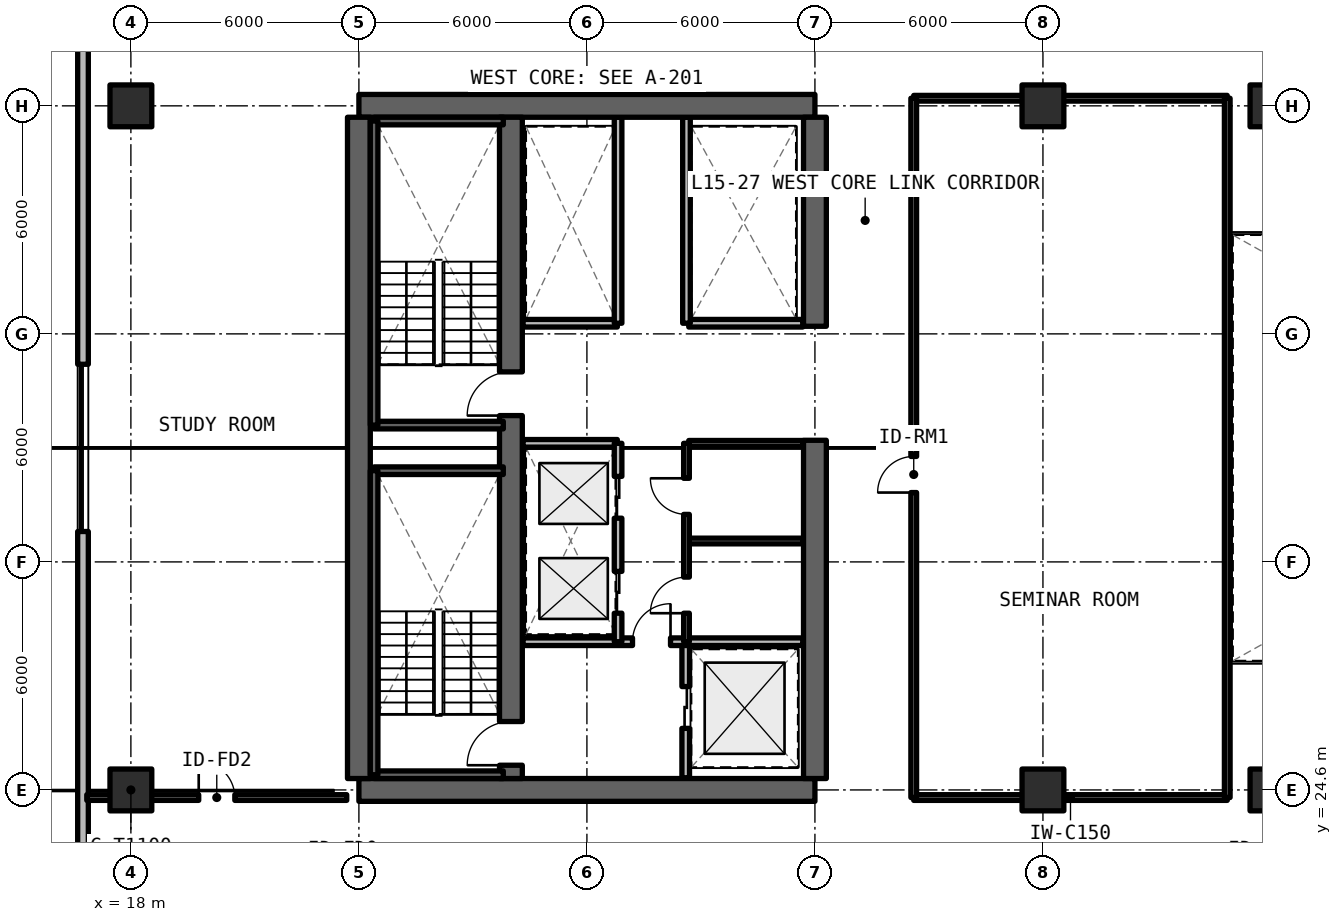
"""IFC4 building model, lengths in metres.
Left out: names, types, materials, properties, quantities, classifications, styles, units other than length and angle.
Written with IfcOpenShell. Run it as: python <this file> out.ifc"""

import sys

from ifc_helpers import new_model, si_unit, direction, frame, frame_2d, origin, origin_2d, place, context, subcontext, project, spatial, rectangle, extrude, element, fill, save


model = new_model("IFC4")
c1 = context("Model", 3, precision=1e-05, world=origin(), true_north=direction((0.0, 1.0)))
c2 = subcontext(c1, "Body", "Model", "MODEL_VIEW")
j1 = project(units=[si_unit("LENGTHUNIT", "METRE"), si_unit("PLANEANGLEUNIT", "RADIAN")], contexts=[c1])
p1 = place(None, origin())
s1 = spatial("IfcSite", under=j1, at=p1, CompositionType="ELEMENT")
p2 = place(p1, origin())
s2 = spatial("IfcBuilding", under=s1, at=p2, CompositionType="ELEMENT")
p3 = place(p2, frame((0.0, 0.0, 55.44)))
s3 = spatial("IfcBuildingStorey", under=s2, at=p3, CompositionType="ELEMENT", Elevation=55.44)
for number, where, z_axis, x_axis in (
    (1, (24.0, 24.6, 0.0), (0.0, 0.0, 1.0), (1.0, 0.0, 0.0)),
    (2, (36.0, 42.6, 0.0), (0.0, 0.0, 1.0), (-1.0, 0.0, 0.0)),
):
    element("IfcWall", number, at=place(p3, frame(where, z_axis=z_axis, x_axis=x_axis)), inside=s3, PredefinedType="SHEAR", context=c2, shape_type="SweptSolid", body=[
        extrude(rectangle(XDim=12.0, YDim=0.6, at=frame_2d((6.0, 0.0))), origin(), (0.0, 0.0, 1.0), 3.3),
    ])
p4 = place(p3, frame((24.0, 24.9, 0.0), z_axis=(0.0, 0.0, 1.0), x_axis=(0.0, 1.0, 0.0)))
e3 = element("IfcWall", 3, at=p4, inside=s3, PredefinedType="SHEAR", context=c2, shape_type="SweptSolid", body=[
    extrude(rectangle(XDim=17.4, YDim=0.6, at=frame_2d((8.7, 0.0))), origin(), (0.0, 0.0, 1.0), 3.3),
])
p5 = place(p3, frame((36.0, 24.9, 0.0), z_axis=(0.0, 0.0, 1.0), x_axis=(0.0, 1.0, 0.0)))
e4 = element("IfcWall", 4, at=p5, inside=s3, PredefinedType="SHEAR", context=c2, shape_type="SweptSolid", body=[
    extrude(rectangle(XDim=8.9, YDim=0.6, at=frame_2d((4.45, 0.0))), origin(), (0.0, 0.0, 1.0), 3.3),
])
p6 = place(p3, frame((36.0, 36.8, 0.0), z_axis=(0.0, 0.0, 1.0), x_axis=(0.0, 1.0, 0.0)))
e5 = element("IfcWall", 5, at=p6, inside=s3, PredefinedType="SHEAR", context=c2, shape_type="SweptSolid", body=[
    extrude(rectangle(XDim=5.5, YDim=0.6, at=frame_2d((2.75, 0.0))), origin(), (0.0, 0.0, 1.0), 3.3),
])
p7 = place(p3, frame((28.0, 24.9, 0.0), z_axis=(0.0, 0.0, 1.0), x_axis=(0.0, 1.0, 0.0)))
e6 = element("IfcWall", 6, at=p7, inside=s3, PredefinedType="SHEAR", context=c2, shape_type="SweptSolid", body=[
    extrude(rectangle(XDim=17.4, YDim=0.6, at=frame_2d((8.7, 0.0))), origin(), (0.0, 0.0, 1.0), 3.3),
])
p8 = place(p7, frame((0.35, 0.0, 0.0)))
e7 = element("IfcOpeningElement", 7, at=p8, cuts=e6, PredefinedType="OPENING", context=c2, shape_type="SweptSolid", body=[
    extrude(rectangle(XDim=1.15, YDim=2.15, at=frame_2d((0.575, 1.075))), frame((0.0, 0.31, 0.0), z_axis=(0.0, -1.0, 0.0), x_axis=(1.0, 0.0, 0.0)), (0.0, 0.0, 1.0), 0.62),
])
p9 = place(p7, frame((9.55, 0.0, 0.0)))
e8 = element("IfcOpeningElement", 8, at=p9, cuts=e6, PredefinedType="OPENING", context=c2, shape_type="SweptSolid", body=[
    extrude(rectangle(XDim=1.15, YDim=2.15, at=frame_2d((0.575, 1.075))), frame((0.0, 0.31, 0.0), z_axis=(0.0, -1.0, 0.0), x_axis=(1.0, 0.0, 0.0)), (0.0, 0.0, 1.0), 0.62),
])
for number, where, z_axis, x_axis in (
    (9, (18.0, 24.6, 0.0), (0.0, 0.0, 1.0), (1.0, 0.0, 0.0)),
    (10, (18.0, 42.6, 0.0), (0.0, 0.0, 1.0), (1.0, 0.0, 0.0)),
    (11, (42.0, 24.6, 0.0), (0.0, 0.0, 1.0), (1.0, 0.0, 0.0)),
    (12, (42.0, 42.6, 0.0), (0.0, 0.0, 1.0), (1.0, 0.0, 0.0)),
    (13, (48.0, 24.6, 0.0), (0.0, 0.0, 1.0), (1.0, 0.0, 0.0)),
    (14, (48.0, 42.6, 0.0), (0.0, 0.0, 1.0), (1.0, 0.0, 0.0)),
):
    element("IfcColumn", number, at=place(p3, frame(where, z_axis=z_axis, x_axis=x_axis)), inside=s3, PredefinedType="COLUMN", context=c2, shape_type="SweptSolid", body=[
        extrude(rectangle(XDim=1.1, YDim=1.1, at=origin_2d()), origin(), (0.0, 0.0, 1.0), 3.3),
    ])
p10 = place(p3, frame((16.74, 55.342, 0.0), z_axis=(0.0, 0.0, 1.0), x_axis=(0.0, -1.0, 0.0)))
e15 = element("IfcWall", 15, at=p10, inside=s3, PredefinedType="SOLIDWALL", context=c2, shape_type="SweptSolid", body=[
    extrude(rectangle(XDim=43.484, YDim=0.28, at=frame_2d((21.742, 0.0))), origin(), (0.0, 0.0, 1.0), 3.08),
])
p11 = place(p10, frame((19.542, 0.0, 0.78)))
e16 = element("IfcOpeningElement", 16, at=p11, cuts=e15, PredefinedType="OPENING", context=c2, shape_type="SweptSolid", body=[
    extrude(rectangle(XDim=4.4, YDim=1.66, at=frame_2d((2.2, 0.83))), frame((0.0, 0.15, 0.0), z_axis=(0.0, -1.0, 0.0), x_axis=(1.0, 0.0, 0.0)), (0.0, 0.0, 1.0), 0.3),
])
p12 = place(p10, frame((37.573, 0.0, 0.78)))
e17 = element("IfcOpeningElement", 17, at=p12, cuts=e15, PredefinedType="OPENING", context=c2, shape_type="SweptSolid", body=[
    extrude(rectangle(XDim=4.4, YDim=1.66, at=frame_2d((2.2, 0.83))), frame((0.0, 0.15, 0.0), z_axis=(0.0, -1.0, 0.0), x_axis=(1.0, 0.0, 0.0)), (0.0, 0.0, 1.0), 0.3),
])
p13 = place(p3, frame((32.6, 24.92, 0.0), z_axis=(0.0, 0.0, 1.0), x_axis=(0.0, 1.0, 0.0)))
e18 = element("IfcWall", 18, at=p13, inside=s3, PredefinedType="SOLIDWALL", context=c2, shape_type="SweptSolid", body=[
    extrude(rectangle(XDim=3.58, YDim=0.2, at=frame_2d((1.79, 0.0))), origin(), (0.0, 0.0, 1.0), 2.35),
])
p14 = place(p13, frame((1.3, 0.0, 0.0)))
e19 = element("IfcOpeningElement", 19, at=p14, cuts=e18, PredefinedType="OPENING", context=c2, shape_type="SweptSolid", body=[
    extrude(rectangle(XDim=1.1, YDim=2.2, at=frame_2d((0.55, 1.1))), frame((0.0, 0.11, 0.0), z_axis=(0.0, -1.0, 0.0), x_axis=(1.0, 0.0, 0.0)), (0.0, 0.0, 1.0), 0.22),
])
p15 = place(p3, frame((28.32, 28.5, 0.0), z_axis=(0.0, 0.0, 1.0), x_axis=(1.0, 0.0, 0.0)))
e20 = element("IfcWall", 20, at=p15, inside=s3, PredefinedType="SOLIDWALL", context=c2, shape_type="SweptSolid", body=[
    extrude(rectangle(XDim=7.36, YDim=0.2, at=frame_2d((3.68, 0.0))), origin(), (0.0, 0.0, 1.0), 2.35),
])
p16 = place(p15, frame((2.88, 0.0, 0.0)))
e21 = element("IfcOpeningElement", 21, at=p16, cuts=e20, PredefinedType="OPENING", context=c2, shape_type="SweptSolid", body=[
    extrude(rectangle(XDim=1.0, YDim=2.15, at=frame_2d((0.5, 1.075))), frame((0.0, 0.11, 0.0), z_axis=(0.0, -1.0, 0.0), x_axis=(1.0, 0.0, 0.0)), (0.0, 0.0, 1.0), 0.22),
])
p17 = place(p3, frame((28.32, 33.72, 0.0), z_axis=(0.0, 0.0, 1.0), x_axis=(1.0, 0.0, 0.0)))
e22 = element("IfcWall", 22, at=p17, inside=s3, PredefinedType="SOLIDWALL", context=c2, shape_type="SweptSolid", body=[
    extrude(rectangle(XDim=2.48, YDim=0.2, at=frame_2d((1.24, 0.0))), origin(), (0.0, 0.0, 1.0), 2.35),
])
p18 = place(p3, frame((30.82, 28.5, 0.0), z_axis=(0.0, 0.0, 1.0), x_axis=(0.0, 1.0, 0.0)))
e23 = element("IfcWall", 23, at=p18, inside=s3, PredefinedType="SOLIDWALL", context=c2, shape_type="SweptSolid", body=[
    extrude(rectangle(XDim=5.22, YDim=0.2, at=frame_2d((2.61, 0.0))), origin(), (0.0, 0.0, 1.0), 2.35),
])
p19 = place(p18, frame((0.75, 0.0, 0.0)))
e24 = element("IfcOpeningElement", 24, at=p19, cuts=e23, PredefinedType="OPENING", context=c2, shape_type="SweptSolid", body=[
    extrude(rectangle(XDim=1.1, YDim=2.2, at=frame_2d((0.55, 1.1))), frame((0.0, 0.11, 0.0), z_axis=(0.0, -1.0, 0.0), x_axis=(1.0, 0.0, 0.0)), (0.0, 0.0, 1.0), 0.22),
])
p20 = place(p18, frame((3.25, 0.0, 0.0)))
e25 = element("IfcOpeningElement", 25, at=p20, cuts=e23, PredefinedType="OPENING", context=c2, shape_type="SweptSolid", body=[
    extrude(rectangle(XDim=1.1, YDim=2.2, at=frame_2d((0.55, 1.1))), frame((0.0, 0.11, 0.0), z_axis=(0.0, -1.0, 0.0), x_axis=(1.0, 0.0, 0.0)), (0.0, 0.0, 1.0), 0.22),
])
for number, where, z_axis, x_axis in (
    (26, (32.68, 31.15, 0.0), (0.0, 0.0, 1.0), (1.0, 0.0, 0.0)),
    (27, (32.68, 33.72, 0.0), (0.0, 0.0, 1.0), (1.0, 0.0, 0.0)),
):
    element("IfcWall", number, at=place(p3, frame(where, z_axis=z_axis, x_axis=x_axis)), inside=s3, PredefinedType="SOLIDWALL", context=c2, shape_type="SweptSolid", body=[
        extrude(rectangle(XDim=3.0, YDim=0.15, at=frame_2d((1.5, 0.0))), origin(), (0.0, 0.0, 1.0), 2.35),
    ])
p21 = place(p3, frame((32.62, 28.5, 0.0), z_axis=(0.0, 0.0, 1.0), x_axis=(0.0, 1.0, 0.0)))
e28 = element("IfcWall", 28, at=p21, inside=s3, PredefinedType="SOLIDWALL", context=c2, shape_type="SweptSolid", body=[
    extrude(rectangle(XDim=5.22, YDim=0.15, at=frame_2d((2.61, 0.0))), origin(), (0.0, 0.0, 1.0), 2.35),
])
p22 = place(p21, frame((0.75, 0.0, 0.0)))
e29 = element("IfcOpeningElement", 29, at=p22, cuts=e28, PredefinedType="OPENING", context=c2, shape_type="SweptSolid", body=[
    extrude(rectangle(XDim=0.95, YDim=2.15, at=frame_2d((0.475, 1.075))), frame((0.0, 0.085, 0.0), z_axis=(0.0, -1.0, 0.0), x_axis=(1.0, 0.0, 0.0)), (0.0, 0.0, 1.0), 0.17),
])
p23 = place(p21, frame((3.35, 0.0, 0.0)))
e30 = element("IfcOpeningElement", 30, at=p23, cuts=e28, PredefinedType="OPENING", context=c2, shape_type="SweptSolid", body=[
    extrude(rectangle(XDim=0.95, YDim=2.15, at=frame_2d((0.475, 1.075))), frame((0.0, 0.085, 0.0), z_axis=(0.0, -1.0, 0.0), x_axis=(1.0, 0.0, 0.0)), (0.0, 0.0, 1.0), 0.17),
])
p24 = place(p3, frame((28.32, 36.88, 0.0), z_axis=(0.0, 0.0, 1.0), x_axis=(1.0, 0.0, 0.0)))
e31 = element("IfcWall", 31, at=p24, inside=s3, PredefinedType="SOLIDWALL", context=c2, shape_type="SweptSolid", body=[
    extrude(rectangle(XDim=2.48, YDim=0.2, at=frame_2d((1.24, 0.0))), origin(), (0.0, 0.0, 1.0), 2.35),
])
p25 = place(p3, frame((30.82, 36.88, 0.0), z_axis=(0.0, 0.0, 1.0), x_axis=(0.0, 1.0, 0.0)))
e32 = element("IfcWall", 32, at=p25, inside=s3, PredefinedType="SOLIDWALL", context=c2, shape_type="SweptSolid", body=[
    extrude(rectangle(XDim=5.42, YDim=0.2, at=frame_2d((2.71, 0.0))), origin(), (0.0, 0.0, 1.0), 2.35),
])
p26 = place(p3, frame((32.68, 36.88, 0.0), z_axis=(0.0, 0.0, 1.0), x_axis=(1.0, 0.0, 0.0)))
e33 = element("IfcWall", 33, at=p26, inside=s3, PredefinedType="SOLIDWALL", context=c2, shape_type="SweptSolid", body=[
    extrude(rectangle(XDim=3.0, YDim=0.2, at=frame_2d((1.5, 0.0))), origin(), (0.0, 0.0, 1.0), 2.35),
])
p27 = place(p3, frame((32.62, 36.88, 0.0), z_axis=(0.0, 0.0, 1.0), x_axis=(0.0, 1.0, 0.0)))
e34 = element("IfcWall", 34, at=p27, inside=s3, PredefinedType="SOLIDWALL", context=c2, shape_type="SweptSolid", body=[
    extrude(rectangle(XDim=5.42, YDim=0.2, at=frame_2d((2.71, 0.0))), origin(), (0.0, 0.0, 1.0), 2.35),
])
for number, where, z_axis, x_axis in (
    (35, (38.6, 24.4, 0.0), (0.0, 0.0, 1.0), (1.0, 0.0, 0.0)),
    (36, (38.6, 42.8, 0.0), (0.0, 0.0, 1.0), (1.0, 0.0, 0.0)),
):
    element("IfcWall", number, at=place(p3, frame(where, z_axis=z_axis, x_axis=x_axis)), inside=s3, PredefinedType="SOLIDWALL", context=c2, shape_type="SweptSolid", body=[
        extrude(rectangle(XDim=8.25, YDim=0.15, at=frame_2d((4.125, 0.0))), origin(), (0.0, 0.0, 1.0), 2.295),
    ])
p28 = place(p3, frame((38.6, 24.4, 0.0), z_axis=(0.0, 0.0, 1.0), x_axis=(0.0, 1.0, 0.0)))
e37 = element("IfcWall", 37, at=p28, inside=s3, PredefinedType="SOLIDWALL", context=c2, shape_type="SweptSolid", body=[
    extrude(rectangle(XDim=18.4, YDim=0.15, at=frame_2d((9.2, 0.0))), origin(), (0.0, 0.0, 1.0), 2.35),
])
p29 = place(p28, frame((8.025, 0.0, 0.0)))
e38 = element("IfcOpeningElement", 38, at=p29, cuts=e37, PredefinedType="OPENING", context=c2, shape_type="SweptSolid", body=[
    extrude(rectangle(XDim=0.95, YDim=2.15, at=frame_2d((0.475, 1.075))), frame((0.0, 0.085, 0.0), z_axis=(0.0, -1.0, 0.0), x_axis=(1.0, 0.0, 0.0)), (0.0, 0.0, 1.0), 0.17),
])
p30 = place(p3, frame((46.85, 24.4, 0.0), z_axis=(0.0, 0.0, 1.0), x_axis=(0.0, 1.0, 0.0)))
e39 = element("IfcWall", 39, at=p30, inside=s3, PredefinedType="SOLIDWALL", context=c2, shape_type="SweptSolid", body=[
    extrude(rectangle(XDim=18.4, YDim=0.15, at=frame_2d((9.2, 0.0))), origin(), (0.0, 0.0, 1.0), 2.35),
])
p31 = place(p3, frame((16.84, 24.4, 0.0), z_axis=(0.0, 0.0, 1.0), x_axis=(1.0, 0.0, 0.0)))
e40 = element("IfcWall", 40, at=p31, inside=s3, PredefinedType="SOLIDWALL", context=c2, shape_type="SweptSolid", body=[
    extrude(rectangle(XDim=6.84, YDim=0.15, at=frame_2d((3.42, 0.0))), origin(), (0.0, 0.0, 1.0), 2.295),
])
p32 = place(p31, frame((2.945, 0.0, 0.0)))
e41 = element("IfcOpeningElement", 41, at=p32, cuts=e40, PredefinedType="OPENING", context=c2, shape_type="SweptSolid", body=[
    extrude(rectangle(XDim=0.95, YDim=2.15, at=frame_2d((0.475, 1.075))), frame((0.0, 0.085, 0.0), z_axis=(0.0, -1.0, 0.0), x_axis=(1.0, 0.0, 0.0)), (0.0, 0.0, 1.0), 0.17),
])
for number, where, z_axis, x_axis in (
    (42, (24.4, 25.0, 0.0), (0.0, 0.0, 1.0), (1.0, 0.0, 0.0)),
    (43, (27.8, 33.0, 0.0), (0.0, 0.0, 1.0), (-1.0, 0.0, 0.0)),
):
    element("IfcWall", number, at=place(p3, frame(where, z_axis=z_axis, x_axis=x_axis)), inside=s3, PredefinedType="SOLIDWALL", context=c2, shape_type="SweptSolid", body=[
        extrude(rectangle(XDim=3.4, YDim=0.2, at=frame_2d((1.7, 0.0))), origin(), (0.0, 0.0, 1.0), 3.3),
    ])
p33 = place(p3, frame((24.4, 33.0, 0.0), z_axis=(0.0, 0.0, 1.0), x_axis=(0.0, -1.0, 0.0)))
e44 = element("IfcWall", 44, at=p33, inside=s3, PredefinedType="SOLIDWALL", context=c2, shape_type="SweptSolid", body=[
    extrude(rectangle(XDim=8.0, YDim=0.2, at=frame_2d((4.0, 0.0))), origin(), (0.0, 0.0, 1.0), 3.3),
])
for number, where, z_axis, x_axis in (
    (45, (24.4, 34.2, 0.0), (0.0, 0.0, 1.0), (1.0, 0.0, 0.0)),
    (46, (27.8, 42.2, 0.0), (0.0, 0.0, 1.0), (-1.0, 0.0, 0.0)),
):
    element("IfcWall", number, at=place(p3, frame(where, z_axis=z_axis, x_axis=x_axis)), inside=s3, PredefinedType="SOLIDWALL", context=c2, shape_type="SweptSolid", body=[
        extrude(rectangle(XDim=3.4, YDim=0.2, at=frame_2d((1.7, 0.0))), origin(), (0.0, 0.0, 1.0), 3.3),
    ])
p34 = place(p3, frame((24.4, 42.2, 0.0), z_axis=(0.0, 0.0, 1.0), x_axis=(0.0, -1.0, 0.0)))
e47 = element("IfcWall", 47, at=p34, inside=s3, PredefinedType="SOLIDWALL", context=c2, shape_type="SweptSolid", body=[
    extrude(rectangle(XDim=8.0, YDim=0.2, at=frame_2d((4.0, 0.0))), origin(), (0.0, 0.0, 1.0), 3.3),
])
p35 = place(p11, origin())
e48 = element("IfcWindow", 48, at=p35, inside=s3, PartitioningType="SINGLE_PANEL", PredefinedType="WINDOW", context=c2, shape_type="SweptSolid", body=[
    extrude(rectangle(XDim=4.4, YDim=1.66, at=frame_2d((2.2, 0.83))), frame((0.0, 0.03, 0.0), z_axis=(0.0, -1.0, 0.0), x_axis=(1.0, 0.0, 0.0)), (0.0, 0.0, 1.0), 0.06),
])
fill(e16, e48)
p36 = place(p14, origin())
e49 = element("IfcDoor", 49, at=p36, inside=s3, OperationType="SLIDING_TO_LEFT", PredefinedType="DOOR", context=c2, shape_type="SweptSolid", body=[
    extrude(rectangle(XDim=1.1, YDim=2.2, at=frame_2d((0.55, 1.1))), frame((0.0, 0.025, 0.0), z_axis=(0.0, -1.0, 0.0), x_axis=(1.0, 0.0, 0.0)), (0.0, 0.0, 1.0), 0.05),
])
fill(e19, e49)
p37 = place(p16, origin())
e50 = element("IfcDoor", 50, at=p37, inside=s3, OperationType="SINGLE_SWING_RIGHT", PredefinedType="DOOR", context=c2, shape_type="SweptSolid", body=[
    extrude(rectangle(XDim=1.0, YDim=2.15, at=frame_2d((0.5, 1.075))), frame((0.0, 0.025, 0.0), z_axis=(0.0, -1.0, 0.0), x_axis=(1.0, 0.0, 0.0)), (0.0, 0.0, 1.0), 0.05),
])
fill(e21, e50)
p38 = place(p19, origin())
e51 = element("IfcDoor", 51, at=p38, inside=s3, OperationType="SLIDING_TO_LEFT", PredefinedType="DOOR", context=c2, shape_type="SweptSolid", body=[
    extrude(rectangle(XDim=1.1, YDim=2.2, at=frame_2d((0.55, 1.1))), frame((0.0, 0.025, 0.0), z_axis=(0.0, -1.0, 0.0), x_axis=(1.0, 0.0, 0.0)), (0.0, 0.0, 1.0), 0.05),
])
fill(e24, e51)
p39 = place(p20, origin())
e52 = element("IfcDoor", 52, at=p39, inside=s3, OperationType="SLIDING_TO_RIGHT", PredefinedType="DOOR", context=c2, shape_type="SweptSolid", body=[
    extrude(rectangle(XDim=1.1, YDim=2.2, at=frame_2d((0.55, 1.1))), frame((0.0, 0.025, 0.0), z_axis=(0.0, -1.0, 0.0), x_axis=(1.0, 0.0, 0.0)), (0.0, 0.0, 1.0), 0.05),
])
fill(e25, e52)
p40 = place(p22, origin())
e53 = element("IfcDoor", 53, at=p40, inside=s3, OperationType="SINGLE_SWING_LEFT", PredefinedType="DOOR", context=c2, shape_type="SweptSolid", body=[
    extrude(rectangle(XDim=0.95, YDim=2.15, at=frame_2d((0.475, 1.075))), frame((0.0, 0.025, 0.0), z_axis=(0.0, -1.0, 0.0), x_axis=(1.0, 0.0, 0.0)), (0.0, 0.0, 1.0), 0.05),
])
fill(e29, e53)
p41 = place(p23, origin())
e54 = element("IfcDoor", 54, at=p41, inside=s3, OperationType="SINGLE_SWING_RIGHT", PredefinedType="DOOR", context=c2, shape_type="SweptSolid", body=[
    extrude(rectangle(XDim=0.95, YDim=2.15, at=frame_2d((0.475, 1.075))), frame((0.0, 0.025, 0.0), z_axis=(0.0, -1.0, 0.0), x_axis=(1.0, 0.0, 0.0)), (0.0, 0.0, 1.0), 0.05),
])
fill(e30, e54)
p42 = place(p29, origin())
e55 = element("IfcDoor", 55, at=p42, inside=s3, OperationType="SINGLE_SWING_LEFT", PredefinedType="DOOR", context=c2, shape_type="SweptSolid", body=[
    extrude(rectangle(XDim=0.95, YDim=2.15, at=frame_2d((0.475, 1.075))), frame((0.0, 0.025, 0.0), z_axis=(0.0, -1.0, 0.0), x_axis=(1.0, 0.0, 0.0)), (0.0, 0.0, 1.0), 0.05),
])
fill(e38, e55)
p43 = place(p32, origin())
e56 = element("IfcDoor", 56, at=p43, inside=s3, OperationType="SINGLE_SWING_LEFT", PredefinedType="DOOR", context=c2, shape_type="SweptSolid", body=[
    extrude(rectangle(XDim=0.95, YDim=2.15, at=frame_2d((0.475, 1.075))), frame((0.0, 0.025, 0.0), z_axis=(0.0, -1.0, 0.0), x_axis=(1.0, 0.0, 0.0)), (0.0, 0.0, 1.0), 0.05),
])
fill(e41, e56)
p44 = place(p8, origin())
e57 = element("IfcDoor", 57, at=p44, inside=s3, OperationType="SINGLE_SWING_RIGHT", PredefinedType="DOOR", context=c2, shape_type="SweptSolid", body=[
    extrude(rectangle(XDim=1.15, YDim=2.15, at=frame_2d((0.575, 1.075))), frame((0.0, 0.025, 0.0), z_axis=(0.0, -1.0, 0.0), x_axis=(1.0, 0.0, 0.0)), (0.0, 0.0, 1.0), 0.05),
])
fill(e7, e57)
p45 = place(p9, origin())
e58 = element("IfcDoor", 58, at=p45, inside=s3, OperationType="SINGLE_SWING_LEFT", PredefinedType="DOOR", context=c2, shape_type="SweptSolid", body=[
    extrude(rectangle(XDim=1.15, YDim=2.15, at=frame_2d((0.575, 1.075))), frame((0.0, 0.025, 0.0), z_axis=(0.0, -1.0, 0.0), x_axis=(1.0, 0.0, 0.0)), (0.0, 0.0, 1.0), 0.05),
])
fill(e8, e58)
save(model, sys.argv[1])
